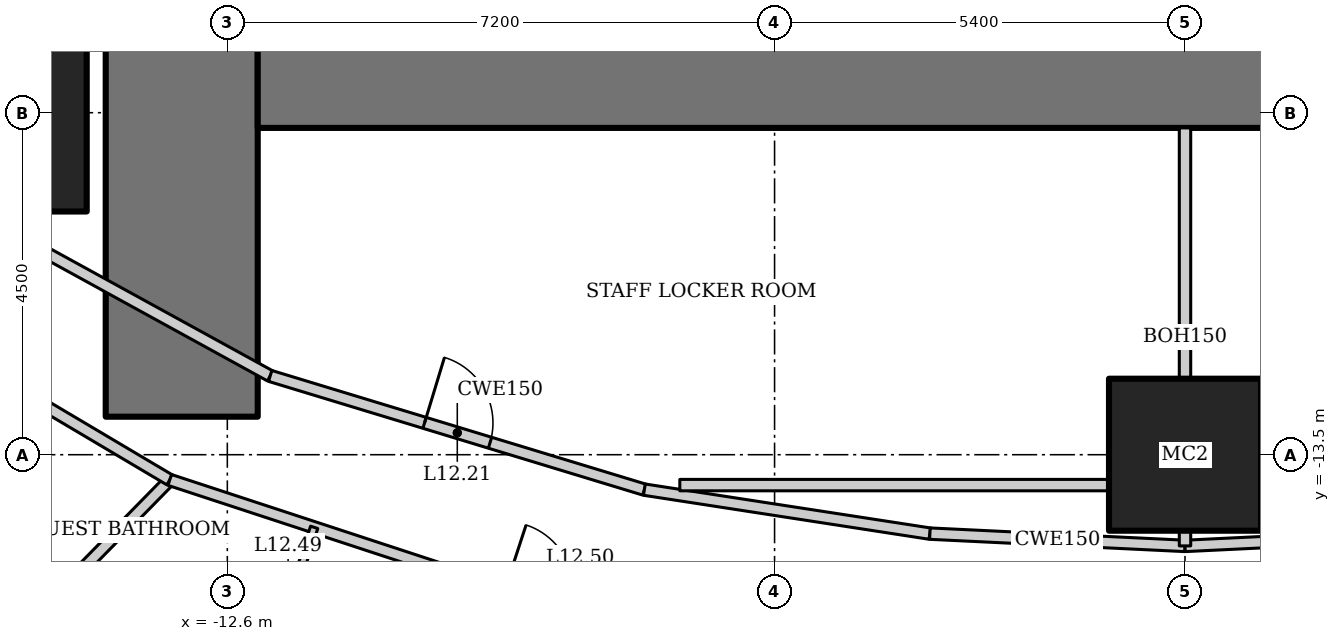
"""IFC4 building model, lengths in metres.
Left out: names, types, materials, properties, quantities, classifications, styles, units other than length and angle.
Written with IfcOpenShell. Run it as: python <this file> out.ifc"""

import sys

from ifc_helpers import new_model, si_unit, direction, frame, frame_2d, origin, origin_2d, place, context, subcontext, project, spatial, rectangle, hollow_rectangle, extrude, element, fill, save


model = new_model("IFC4")
c1 = context("Model", 3, precision=1e-05, world=origin(), true_north=direction((0.0, 1.0)))
c2 = subcontext(c1, "Body", "Model", "MODEL_VIEW")
j1 = project(units=[si_unit("LENGTHUNIT", "METRE"), si_unit("PLANEANGLEUNIT", "RADIAN")], contexts=[c1])
p1 = place(None, origin())
s1 = spatial("IfcSite", under=j1, at=p1, CompositionType="ELEMENT")
p2 = place(p1, origin())
s2 = spatial("IfcBuilding", under=s1, at=p2, CompositionType="ELEMENT")
p3 = place(p2, frame((0.0, 0.0, 58.6)))
s3 = spatial("IfcBuildingStorey", under=s2, at=p3, CompositionType="ELEMENT", Elevation=58.6)
p4 = place(p3, frame((-15.75, -9.0, 0.0), z_axis=(0.0, 0.0, 1.0), x_axis=(1.0, 0.0, 0.0)))
e1 = element("IfcColumn", 1, at=p4, inside=s3, PredefinedType="COLUMN", context=c2, shape_type="SweptSolid", body=[
    extrude(hollow_rectangle(XDim=2.6, YDim=2.6, WallThickness=0.13, at=origin_2d()), origin(), (0.0, 0.0, 1.0), 3.6),
])
p5 = place(p3, frame((0.0, -13.5, 0.0), z_axis=(0.0, 0.0, 1.0), x_axis=(1.0, 0.0, 0.0)))
e2 = element("IfcColumn", 2, at=p5, inside=s3, PredefinedType="COLUMN", context=c2, shape_type="SweptSolid", body=[
    extrude(hollow_rectangle(XDim=2.0, YDim=2.0, WallThickness=0.17, at=origin_2d()), origin(), (0.0, 0.0, 1.0), 3.6),
])
p6 = place(p3, frame((-13.2, 13.0, 0.0), z_axis=(0.0, 0.0, 1.0), x_axis=(0.0, -1.0, 0.0)))
e3 = element("IfcWall", 3, at=p6, inside=s3, PredefinedType="SHEAR", context=c2, shape_type="SweptSolid", body=[
    extrude(rectangle(XDim=26.0, YDim=2.0, at=frame_2d((13.0, 0.0))), origin(), (0.0, 0.0, 1.0), 3.6),
])
p7 = place(p6, frame((12.1, 0.0, 0.0)))
e4 = element("IfcOpeningElement", 4, at=p7, cuts=e3, PredefinedType="OPENING", context=c2, shape_type="SweptSolid", body=[
    extrude(rectangle(XDim=1.8, YDim=2.1, at=frame_2d((0.9, 1.05))), frame((0.0, 1.01, 0.0), z_axis=(0.0, -1.0, 0.0), x_axis=(1.0, 0.0, 0.0)), (0.0, 0.0, 1.0), 2.02),
])
p8 = place(p3, frame((-12.2, -8.0, 0.0), z_axis=(0.0, 0.0, 1.0), x_axis=(1.0, 0.0, 0.0)))
e5 = element("IfcWall", 5, at=p8, inside=s3, PredefinedType="SHEAR", context=c2, shape_type="SweptSolid", body=[
    extrude(rectangle(XDim=24.4, YDim=2.4, at=frame_2d((12.2, 0.0))), origin(), (0.0, 0.0, 1.0), 3.6),
])
p9 = place(p3, frame((-17.97, -18.542, 0.0), z_axis=(0.0, 0.0, 1.0), x_axis=(0.699736251994, 0.714401272147, 0.0)))
e6 = element("IfcWall", 6, at=p9, inside=s3, PredefinedType="PARTITIONING", context=c2, shape_type="SweptSolid", body=[
    extrude(rectangle(XDim=6.593, YDim=0.15, at=frame_2d((3.296, 0.0))), origin(), (0.0, 0.0, 1.0), 2.528),
])
p10 = place(p3, frame((-18.681, -10.675, 0.0), z_axis=(0.0, 0.0, 1.0), x_axis=(0.860147339762, -0.510045639036, 0.0)))
e7 = element("IfcWall", 7, at=p10, inside=s3, PredefinedType="PARTITIONING", context=c2, shape_type="SweptSolid", body=[
    extrude(rectangle(XDim=6.19, YDim=0.15, at=frame_2d((3.095, 0.0))), origin(), (0.0, 0.0, 1.0), 3.45),
])
p11 = place(p10, frame((2.505, 0.0, 0.0)))
e8 = element("IfcOpeningElement", 8, at=p11, cuts=e7, PredefinedType="OPENING", context=c2, shape_type="SweptSolid", body=[
    extrude(rectangle(XDim=0.9, YDim=2.1, at=frame_2d((0.45, 1.05))), frame((0.0, 0.085, 0.0), z_axis=(0.0, -1.0, 0.0), x_axis=(1.0, 0.0, 0.0)), (0.0, 0.0, 1.0), 0.17),
])
p12 = place(p3, frame((-13.357, -13.832, 0.0), z_axis=(0.0, 0.0, 1.0), x_axis=(0.950106803111, -0.311924770869, 0.0)))
e9 = element("IfcWall", 9, at=p12, inside=s3, PredefinedType="PARTITIONING", context=c2, shape_type="SweptSolid", body=[
    extrude(rectangle(XDim=5.689, YDim=0.15, at=frame_2d((2.845, 0.0))), origin(), (0.0, 0.0, 1.0), 3.45),
])
p13 = place(p12, frame((4.639, 0.0, 0.0)))
e10 = element("IfcOpeningElement", 10, at=p13, cuts=e9, PredefinedType="OPENING", context=c2, shape_type="SweptSolid", body=[
    extrude(rectangle(XDim=0.9, YDim=2.1, at=frame_2d((0.45, 1.05))), frame((0.0, 0.085, 0.0), z_axis=(0.0, -1.0, 0.0), x_axis=(1.0, 0.0, 0.0)), (0.0, 0.0, 1.0), 0.17),
])
p14 = place(p3, frame((-17.021, -9.726, 0.0), z_axis=(0.0, 0.0, 1.0), x_axis=(0.876522084062, -0.481361647986, 0.0)))
e11 = element("IfcWall", 11, at=p14, inside=s3, PredefinedType="PARTITIONING", context=c2, shape_type="SweptSolid", body=[
    extrude(rectangle(XDim=5.687, YDim=0.15, at=frame_2d((2.844, 0.0))), origin(), (0.0, 0.0, 1.0), 3.45),
])
p15 = place(p3, frame((-12.036, -12.464, 0.0), z_axis=(0.0, 0.0, 1.0), x_axis=(0.956795045135, -0.290763205385, 0.0)))
e12 = element("IfcWall", 12, at=p15, inside=s3, PredefinedType="PARTITIONING", context=c2, shape_type="SweptSolid", body=[
    extrude(rectangle(XDim=5.146, YDim=0.15, at=frame_2d((2.573, 0.0))), origin(), (0.0, 0.0, 1.0), 3.45),
])
p16 = place(p15, frame((2.123, 0.0, 0.0)))
e13 = element("IfcOpeningElement", 13, at=p16, cuts=e12, PredefinedType="OPENING", context=c2, shape_type="SweptSolid", body=[
    extrude(rectangle(XDim=0.9, YDim=2.1, at=frame_2d((0.45, 1.05))), frame((0.0, 0.085, 0.0), z_axis=(0.0, -1.0, 0.0), x_axis=(1.0, 0.0, 0.0)), (0.0, 0.0, 1.0), 0.17),
])
p17 = place(p3, frame((-7.113, -13.96, 0.0), z_axis=(0.0, 0.0, 1.0), x_axis=(0.988343461108, -0.152240608529, 0.0)))
e14 = element("IfcWall", 14, at=p17, inside=s3, PredefinedType="PARTITIONING", context=c2, shape_type="SweptSolid", body=[
    extrude(rectangle(XDim=3.801, YDim=0.15, at=frame_2d((1.9, 0.0))), origin(), (0.0, 0.0, 1.0), 3.45),
])
for number, where, z_axis, x_axis in (
    (15, (-3.356, -14.538, 0.0), (0.0, 0.0, 1.0), (0.999, -0.048, 0.0)),
    (16, (0.0, -14.7, 0.0), (0.0, 0.0, 1.0), (0.999, 0.048, 0.0)),
):
    element("IfcWall", number, at=place(p3, frame(where, z_axis=z_axis, x_axis=x_axis)), inside=s3, PredefinedType="PARTITIONING", context=c2, shape_type="SweptSolid", body=[
        extrude(rectangle(XDim=3.36, YDim=0.15, at=frame_2d((1.68, 0.0))), origin(), (0.0, 0.0, 1.0), 3.45),
    ])
p18 = place(p3, frame((0.0, -9.2, 0.0), z_axis=(0.0, 0.0, 1.0), x_axis=(0.0, -1.0, 0.0)))
e17 = element("IfcWall", 17, at=p18, inside=s3, PredefinedType="PARTITIONING", context=c2, shape_type="SweptSolid", body=[
    extrude(rectangle(XDim=5.5, YDim=0.15, at=frame_2d((2.75, 0.0))), origin(), (0.0, 0.0, 1.0), 2.924),
])
p19 = place(p3, frame((-6.647, -13.9, 0.0), z_axis=(0.0, 0.0, 1.0), x_axis=(1.0, 0.0, 0.0)))
e18 = element("IfcWall", 18, at=p19, inside=s3, PredefinedType="PARTITIONING", context=c2, shape_type="SweptSolid", body=[
    extrude(rectangle(XDim=6.647, YDim=0.15, at=frame_2d((3.323, 0.0))), origin(), (0.0, 0.0, 1.0), 3.45),
])
p20 = place(p3, frame((0.0, -14.4, 0.0), z_axis=(0.0, 0.0, 1.0), x_axis=(1.0, 0.0, 0.0)))
e19 = element("IfcWall", 19, at=p20, inside=s3, PredefinedType="PARTITIONING", context=c2, shape_type="SweptSolid", body=[
    extrude(rectangle(XDim=3.401, YDim=0.15, at=frame_2d((1.701, 0.0))), origin(), (0.0, 0.0, 1.0), 3.45),
])
p21 = place(p3, frame((-11.457, -14.456, 0.0), z_axis=(0.0, 0.0, 1.0), x_axis=(-0.311890952591, -0.950117905153, 0.0)))
e20 = element("IfcWall", 20, at=p21, inside=s3, PredefinedType="PARTITIONING", context=c2, shape_type="SweptSolid", body=[
    extrude(rectangle(XDim=2.4, YDim=0.1, at=frame_2d((1.2, 0.0))), origin(), (0.0, 0.0, 1.0), 3.45),
])
p22 = place(p21, frame((0.7, 0.0, 0.0)))
e21 = element("IfcOpeningElement", 21, at=p22, cuts=e20, PredefinedType="OPENING", context=c2, shape_type="SweptSolid", body=[
    extrude(rectangle(XDim=0.8, YDim=2.1, at=frame_2d((0.4, 1.05))), frame((0.0, 0.06, 0.0), z_axis=(0.0, -1.0, 0.0), x_axis=(1.0, 0.0, 0.0)), (0.0, 0.0, 1.0), 0.12),
])
p23 = place(p16, origin())
e22 = element("IfcDoor", 22, at=p23, inside=s3, OperationType="SINGLE_SWING_LEFT", PredefinedType="DOOR", context=c2, shape_type="SweptSolid", body=[
    extrude(rectangle(XDim=0.9, YDim=2.1, at=frame_2d((0.45, 1.05))), frame((0.0, 0.025, 0.0), z_axis=(0.0, -1.0, 0.0), x_axis=(1.0, 0.0, 0.0)), (0.0, 0.0, 1.0), 0.05),
])
fill(e13, e22)
save(model, sys.argv[1])
